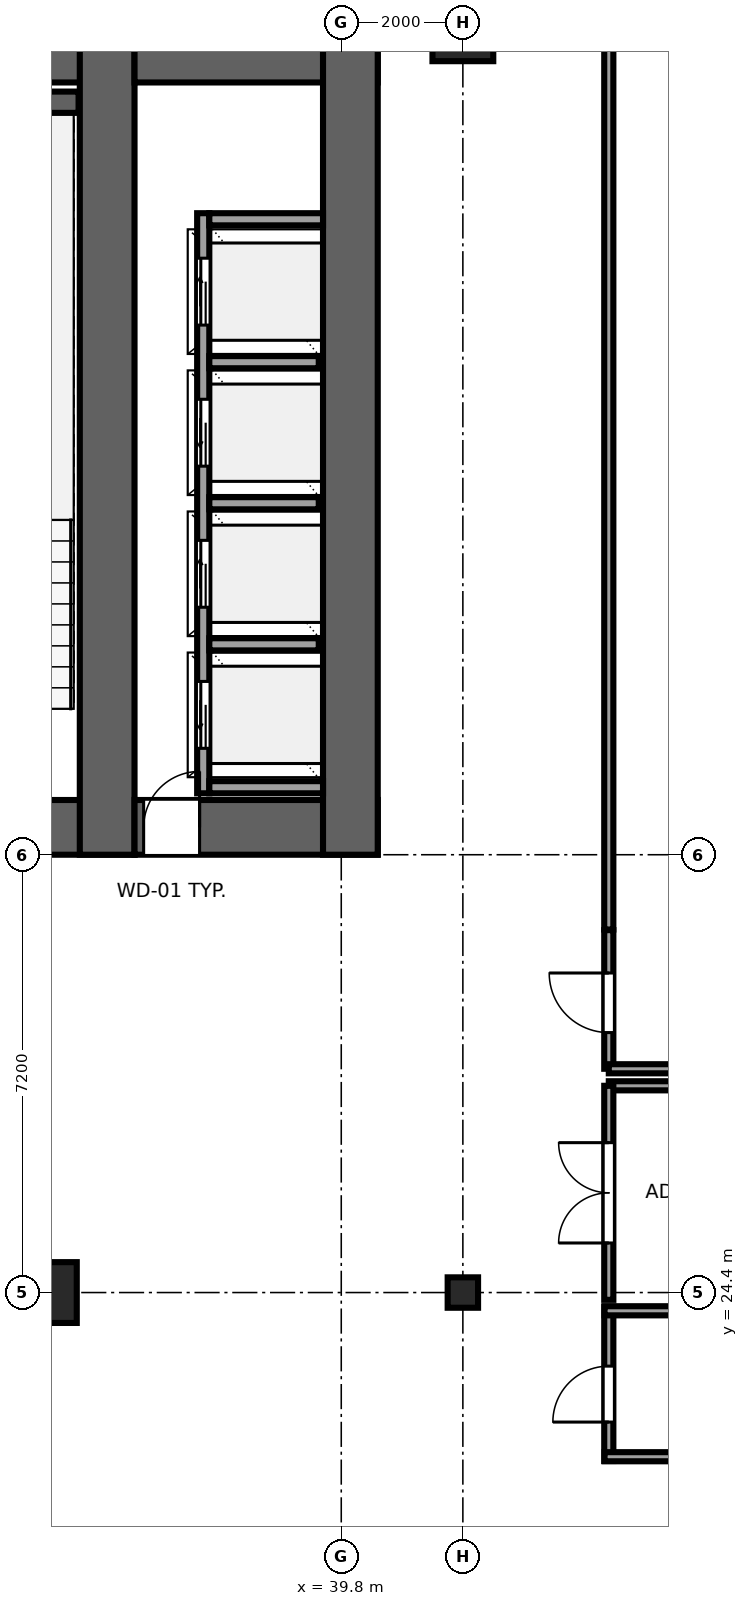
"""IFC4 building model, lengths in metres.
Left out: names, types, materials, properties, quantities, classifications, styles, units other than length and angle.
Written with IfcOpenShell. Run it as: python <this file> out.ifc"""

import sys

from ifc_helpers import new_model, si_unit, direction, frame, frame_2d, origin, origin_2d, place, context, subcontext, project, spatial, rectangle, i_section, extrude, source, transform, mapped, element, fill, save


model = new_model("IFC4")
c1 = context("Model", 3, precision=1e-05, world=origin(), true_north=direction((0.0, 1.0)))
c2 = subcontext(c1, "Body", "Model", "MODEL_VIEW")
j1 = project(units=[si_unit("LENGTHUNIT", "METRE"), si_unit("PLANEANGLEUNIT", "RADIAN")], contexts=[c1])
p1 = place(None, origin())
s1 = spatial("IfcSite", under=j1, at=p1, CompositionType="ELEMENT")
p2 = place(p1, origin())
s2 = spatial("IfcBuilding", under=s1, at=p2, CompositionType="ELEMENT")
p3 = place(p2, frame((0.0, 0.0, 42.65)))
s3 = spatial("IfcBuildingStorey", under=s2, at=p3, CompositionType="ELEMENT", Elevation=42.65)
p4 = place(p3, frame((9.6, 32.05, 0.0), z_axis=(0.0, 0.0, 1.0), x_axis=(1.0, 0.0, 0.0)))
e1 = element("IfcWall", 1, at=p4, inside=s3, PredefinedType="SHEAR", context=c2, shape_type="SweptSolid", body=[
    extrude(rectangle(XDim=26.8, YDim=0.9, at=frame_2d((13.4, 0.0))), origin(), (0.0, 0.0, 1.0), 3.55),
])
p5 = place(p4, frame((7.85, 0.0, 0.0), z_axis=(0.0, 0.0, 1.0), x_axis=(-1.0, 0.0, 0.0)))
e2 = element("IfcOpeningElement", 2, at=p5, cuts=e1, PredefinedType="OPENING", context=c2, shape_type="SweptSolid", body=[
    extrude(rectangle(XDim=1.5, YDim=2.04, at=frame_2d((0.75, 1.02))), frame((0.0, 0.46, 0.0), z_axis=(0.0, -1.0, 0.0), x_axis=(1.0, 0.0, 0.0)), (0.0, 0.0, 1.0), 0.92),
])
p6 = place(p4, frame((14.15, 0.0, 0.0), z_axis=(0.0, 0.0, 1.0), x_axis=(-1.0, 0.0, 0.0)))
e3 = element("IfcOpeningElement", 3, at=p6, cuts=e1, PredefinedType="OPENING", context=c2, shape_type="SweptSolid", body=[
    extrude(rectangle(XDim=1.5, YDim=2.04, at=frame_2d((0.75, 1.02))), frame((0.0, 0.46, 0.0), z_axis=(0.0, -1.0, 0.0), x_axis=(1.0, 0.0, 0.0)), (0.0, 0.0, 1.0), 0.92),
])
p7 = place(p4, frame((20.45, 0.0, 0.0), z_axis=(0.0, 0.0, 1.0), x_axis=(-1.0, 0.0, 0.0)))
e4 = element("IfcOpeningElement", 4, at=p7, cuts=e1, PredefinedType="OPENING", context=c2, shape_type="SweptSolid", body=[
    extrude(rectangle(XDim=1.5, YDim=2.04, at=frame_2d((0.75, 1.02))), frame((0.0, 0.46, 0.0), z_axis=(0.0, -1.0, 0.0), x_axis=(1.0, 0.0, 0.0)), (0.0, 0.0, 1.0), 0.92),
])
p8 = place(p3, frame((9.6, 44.75, 0.0), z_axis=(0.0, 0.0, 1.0), x_axis=(1.0, 0.0, 0.0)))
e5 = element("IfcWall", 5, at=p8, inside=s3, PredefinedType="SHEAR", context=c2, shape_type="SweptSolid", body=[
    extrude(rectangle(XDim=26.8, YDim=0.9, at=frame_2d((13.4, 0.0))), origin(), (0.0, 0.0, 1.0), 3.55),
])
p9 = place(p3, frame((35.95, 31.6, 0.0), z_axis=(0.0, 0.0, 1.0), x_axis=(0.0, 1.0, 0.0)))
e6 = element("IfcWall", 6, at=p9, inside=s3, PredefinedType="SHEAR", context=c2, shape_type="SweptSolid", body=[
    extrude(rectangle(XDim=13.6, YDim=0.9, at=frame_2d((6.8, 0.0))), origin(), (0.0, 0.0, 1.0), 3.55),
])
p10 = place(p3, frame((36.4, 32.05, 0.0), z_axis=(0.0, 0.0, 1.0), x_axis=(1.0, 0.0, 0.0)))
e7 = element("IfcWall", 7, at=p10, inside=s3, PredefinedType="SHEAR", context=c2, shape_type="SweptSolid", body=[
    extrude(rectangle(XDim=4.0, YDim=0.9, at=frame_2d((2.0, 0.0))), origin(), (0.0, 0.0, 1.0), 3.55),
])
p11 = place(p10, frame((1.07, 0.0, 0.0), z_axis=(0.0, 0.0, 1.0), x_axis=(-1.0, 0.0, 0.0)))
e8 = element("IfcOpeningElement", 8, at=p11, cuts=e7, PredefinedType="OPENING", context=c2, shape_type="SweptSolid", body=[
    extrude(rectangle(XDim=0.92, YDim=2.01, at=frame_2d((0.46, 1.005))), frame((0.0, 0.46, 0.0), z_axis=(0.0, -1.0, 0.0), x_axis=(1.0, 0.0, 0.0)), (0.0, 0.0, 1.0), 0.92),
])
p12 = place(p3, frame((36.4, 44.75, 0.0), z_axis=(0.0, 0.0, 1.0), x_axis=(1.0, 0.0, 0.0)))
e9 = element("IfcWall", 9, at=p12, inside=s3, PredefinedType="SHEAR", context=c2, shape_type="SweptSolid", body=[
    extrude(rectangle(XDim=4.0, YDim=0.9, at=frame_2d((2.0, 0.0))), origin(), (0.0, 0.0, 1.0), 3.55),
])
p13 = place(p3, frame((39.95, 31.6, 0.0), z_axis=(0.0, 0.0, 1.0), x_axis=(0.0, 1.0, 0.0)))
e10 = element("IfcWall", 10, at=p13, inside=s3, PredefinedType="SHEAR", context=c2, shape_type="SweptSolid", body=[
    extrude(rectangle(XDim=13.6, YDim=0.9, at=frame_2d((6.8, 0.0))), origin(), (0.0, 0.0, 1.0), 3.55),
])
p14 = place(p3, frame((31.88, 43.975, 0.0), z_axis=(0.0, 0.0, 1.0), x_axis=(1.0, 0.0, 0.0)))
e11 = element("IfcWall", 11, at=p14, inside=s3, PredefinedType="SHEAR", context=c2, shape_type="SweptSolid", body=[
    extrude(rectangle(XDim=3.6, YDim=0.35, at=frame_2d((1.8, 0.0))), origin(), (0.0, 0.0, 1.0), 3.55),
])
m1 = source(origin(), c2, "Body", "SweptSolid", [
    extrude(rectangle(XDim=1.0, YDim=1.0, at=origin_2d()), origin(), (0.0, 0.0, 1.0), 3.55),
])
p15 = place(p3, frame((34.95, 24.4, 0.0), z_axis=(0.0, 0.0, 1.0), x_axis=(1.0, 0.0, 0.0)))
e12 = element("IfcColumn", 12, at=p15, inside=s3, PredefinedType="COLUMN", context=c2, shape_type="MappedRepresentation", body=[
    mapped(m1, transform((0.0, 0.0, 0.0), x_axis=(1.0, 0.0, 0.0), y_axis=(0.0, 1.0, 0.0), z_axis=(0.0, 0.0, 1.0), scale=1.0)),
])
m2 = source(origin(), c2, "Body", "SweptSolid", [
    extrude(i_section(OverallWidth=0.5, OverallDepth=0.5, WebThickness=0.028, FlangeThickness=0.045, at=origin_2d()), origin(), (0.0, 0.0, 1.0), 3.55),
])
p16 = place(p3, frame((41.8, 24.4, 0.0), z_axis=(0.0, 0.0, 1.0), x_axis=(1.0, 0.0, 0.0)))
e13 = element("IfcColumn", 13, at=p16, inside=s3, PredefinedType="COLUMN", context=c2, shape_type="MappedRepresentation", body=[
    mapped(m2, transform((0.0, 0.0, 0.0), x_axis=(1.0, 0.0, 0.0), y_axis=(0.0, 1.0, 0.0), z_axis=(0.0, 0.0, 1.0), scale=1.0)),
])
p17 = place(p3, frame((41.8, 45.15, 0.0), z_axis=(0.0, 0.0, 1.0), x_axis=(1.0, 0.0, 0.0)))
e14 = element("IfcColumn", 14, at=p17, inside=s3, PredefinedType="COLUMN", context=c2, shape_type="MappedRepresentation", body=[
    mapped(m1, transform((0.0, 0.0, 0.0), x_axis=(1.0, 0.0, 0.0), y_axis=(0.0, 1.0, 0.0), z_axis=(0.0, 0.0, 1.0), scale=1.0)),
])
p18 = place(p3, frame((37.53, 32.61, 0.0), z_axis=(0.0, 0.0, 1.0), x_axis=(0.0, 1.0, 0.0)))
e15 = element("IfcWall", 15, at=p18, inside=s3, PredefinedType="SOLIDWALL", context=c2, shape_type="SweptSolid", body=[
    extrude(rectangle(XDim=9.54, YDim=0.2, at=frame_2d((4.77, 0.0))), origin(), (0.0, 0.0, 1.0), 3.37),
])
p19 = place(p18, frame((0.74, 0.0, 0.0)))
e16 = element("IfcOpeningElement", 16, at=p19, cuts=e15, PredefinedType="OPENING", context=c2, shape_type="SweptSolid", body=[
    extrude(rectangle(XDim=1.1, YDim=2.12, at=frame_2d((0.55, 1.06))), frame((0.0, 0.11, 0.0), z_axis=(0.0, -1.0, 0.0), x_axis=(1.0, 0.0, 0.0)), (0.0, 0.0, 1.0), 0.22),
])
p20 = place(p18, frame((3.06, 0.0, 0.0)))
e17 = element("IfcOpeningElement", 17, at=p20, cuts=e15, PredefinedType="OPENING", context=c2, shape_type="SweptSolid", body=[
    extrude(rectangle(XDim=1.1, YDim=2.12, at=frame_2d((0.55, 1.06))), frame((0.0, 0.11, 0.0), z_axis=(0.0, -1.0, 0.0), x_axis=(1.0, 0.0, 0.0)), (0.0, 0.0, 1.0), 0.22),
])
p21 = place(p18, frame((5.38, 0.0, 0.0)))
e18 = element("IfcOpeningElement", 18, at=p21, cuts=e15, PredefinedType="OPENING", context=c2, shape_type="SweptSolid", body=[
    extrude(rectangle(XDim=1.1, YDim=2.12, at=frame_2d((0.55, 1.06))), frame((0.0, 0.11, 0.0), z_axis=(0.0, -1.0, 0.0), x_axis=(1.0, 0.0, 0.0)), (0.0, 0.0, 1.0), 0.22),
])
p22 = place(p18, frame((7.7, 0.0, 0.0)))
e19 = element("IfcOpeningElement", 19, at=p22, cuts=e15, PredefinedType="OPENING", context=c2, shape_type="SweptSolid", body=[
    extrude(rectangle(XDim=1.1, YDim=2.12, at=frame_2d((0.55, 1.06))), frame((0.0, 0.11, 0.0), z_axis=(0.0, -1.0, 0.0), x_axis=(1.0, 0.0, 0.0)), (0.0, 0.0, 1.0), 0.22),
])
for number, where, z_axis, x_axis in (
    (20, (37.63, 32.71, 0.0), (0.0, 0.0, 1.0), (1.0, 0.0, 0.0)),
    (21, (37.63, 42.05, 0.0), (0.0, 0.0, 1.0), (1.0, 0.0, 0.0)),
):
    element("IfcWall", number, at=place(p3, frame(where, z_axis=z_axis, x_axis=x_axis)), inside=s3, PredefinedType="SOLIDWALL", context=c2, shape_type="SweptSolid", body=[
        extrude(rectangle(XDim=1.87, YDim=0.2, at=frame_2d((0.935, 0.0))), origin(), (0.0, 0.0, 1.0), 3.37),
    ])
for number, where, z_axis, x_axis in (
    (22, (37.63, 35.06, 0.0), (0.0, 0.0, 1.0), (1.0, 0.0, 0.0)),
    (23, (37.63, 37.38, 0.0), (0.0, 0.0, 1.0), (1.0, 0.0, 0.0)),
    (24, (37.63, 39.7, 0.0), (0.0, 0.0, 1.0), (1.0, 0.0, 0.0)),
):
    element("IfcWall", number, at=place(p3, frame(where, z_axis=z_axis, x_axis=x_axis)), inside=s3, PredefinedType="SOLIDWALL", context=c2, shape_type="SweptSolid", body=[
        extrude(rectangle(XDim=1.8, YDim=0.2, at=frame_2d((0.9, 0.0))), origin(), (0.0, 0.0, 1.0), 3.37),
    ])
p23 = place(p3, frame((44.2, 21.63, 0.0), z_axis=(0.0, 0.0, 1.0), x_axis=(0.0, 1.0, 0.0)))
e25 = element("IfcWall", 25, at=p23, inside=s3, PredefinedType="PARTITIONING", context=c2, shape_type="SweptSolid", body=[
    extrude(rectangle(XDim=2.54, YDim=0.15, at=frame_2d((1.27, 0.0))), origin(), (0.0, 0.0, 1.0), 3.37),
])
p24 = place(p23, frame((0.64, 0.0, 0.0)))
e26 = element("IfcOpeningElement", 26, at=p24, cuts=e25, PredefinedType="OPENING", context=c2, shape_type="SweptSolid", body=[
    extrude(rectangle(XDim=0.92, YDim=2.01, at=frame_2d((0.46, 1.005))), frame((0.0, 0.085, 0.0), z_axis=(0.0, -1.0, 0.0), x_axis=(1.0, 0.0, 0.0)), (0.0, 0.0, 1.0), 0.17),
])
p25 = place(p3, frame((44.13, 21.7, 0.0), z_axis=(0.0, 0.0, 1.0), x_axis=(1.0, 0.0, 0.0)))
e27 = element("IfcWall", 27, at=p25, inside=s3, PredefinedType="PARTITIONING", context=c2, shape_type="SweptSolid", body=[
    extrude(rectangle(XDim=4.54, YDim=0.15, at=frame_2d((2.27, 0.0))), origin(), (0.0, 0.0, 1.0), 3.37),
])
p26 = place(p3, frame((44.13, 24.1, 0.0), z_axis=(0.0, 0.0, 1.0), x_axis=(1.0, 0.0, 0.0)))
e28 = element("IfcWall", 28, at=p26, inside=s3, PredefinedType="PARTITIONING", context=c2, shape_type="SweptSolid", body=[
    extrude(rectangle(XDim=12.465, YDim=0.15, at=frame_2d((6.232, 0.0))), origin(), (0.0, 0.0, 1.0), 3.37),
])
p27 = place(p3, frame((44.2, 27.8, 0.0), z_axis=(0.0, 0.0, 1.0), x_axis=(1.0, 0.0, 0.0)))
e29 = element("IfcWall", 29, at=p27, inside=s3, PredefinedType="PARTITIONING", context=c2, shape_type="SweptSolid", body=[
    extrude(rectangle(XDim=12.395, YDim=0.15, at=frame_2d((6.198, 0.0))), origin(), (0.0, 0.0, 1.0), 3.37),
])
p28 = place(p3, frame((44.2, 24.28, 0.0), z_axis=(0.0, 0.0, 1.0), x_axis=(0.0, 1.0, 0.0)))
e30 = element("IfcWall", 30, at=p28, inside=s3, PredefinedType="PARTITIONING", context=c2, shape_type="SweptSolid", body=[
    extrude(rectangle(XDim=3.52, YDim=0.15, at=frame_2d((1.76, 0.0))), origin(), (0.0, 0.0, 1.0), 3.37),
])
p29 = place(p28, frame((0.935, 0.0, 0.0)))
e31 = element("IfcOpeningElement", 31, at=p29, cuts=e30, PredefinedType="OPENING", context=c2, shape_type="SweptSolid", body=[
    extrude(rectangle(XDim=1.65, YDim=2.15, at=frame_2d((0.825, 1.075))), frame((0.0, 0.085, 0.0), z_axis=(0.0, -1.0, 0.0), x_axis=(1.0, 0.0, 0.0)), (0.0, 0.0, 1.0), 0.17),
])
p30 = place(p3, frame((44.2, 28.08, 0.0), z_axis=(0.0, 0.0, 1.0), x_axis=(0.0, 1.0, 0.0)))
e32 = element("IfcWall", 32, at=p30, inside=s3, PredefinedType="PARTITIONING", context=c2, shape_type="SweptSolid", body=[
    extrude(rectangle(XDim=2.28, YDim=0.15, at=frame_2d((1.14, 0.0))), origin(), (0.0, 0.0, 1.0), 3.37),
])
p31 = place(p30, frame((0.595, 0.0, 0.0)))
e33 = element("IfcOpeningElement", 33, at=p31, cuts=e32, PredefinedType="OPENING", context=c2, shape_type="SweptSolid", body=[
    extrude(rectangle(XDim=0.98, YDim=2.12, at=frame_2d((0.49, 1.06))), frame((0.0, 0.085, 0.0), z_axis=(0.0, -1.0, 0.0), x_axis=(1.0, 0.0, 0.0)), (0.0, 0.0, 1.0), 0.17),
])
p32 = place(p3, frame((44.2, 28.08, 0.0), z_axis=(0.0, 0.0, 1.0), x_axis=(1.0, 0.0, 0.0)))
e34 = element("IfcWall", 34, at=p32, inside=s3, PredefinedType="PARTITIONING", context=c2, shape_type="SweptSolid", body=[
    extrude(rectangle(XDim=10.03, YDim=0.15, at=frame_2d((5.015, 0.0))), origin(), (0.0, 0.0, 1.0), 3.37),
])
p33 = place(p3, frame((44.2, 30.37, 0.0), z_axis=(0.0, 0.0, 1.0), x_axis=(0.0, 1.0, 0.0)))
e35 = element("IfcWall", 35, at=p33, inside=s3, PredefinedType="PARTITIONING", context=c2, shape_type="SweptSolid", body=[
    extrude(rectangle(XDim=15.225, YDim=0.15, at=frame_2d((7.612, 0.0))), origin(), (0.0, 0.0, 1.0), 3.37),
])
m3 = source(origin(), c2, "Body", "SweptSolid", [
    extrude(rectangle(XDim=0.92, YDim=2.01, at=frame_2d((0.46, 1.005))), frame((0.0, 0.025, 0.0), z_axis=(0.0, -1.0, 0.0), x_axis=(1.0, 0.0, 0.0)), (0.0, 0.0, 1.0), 0.05),
])
p34 = place(p11, origin())
e36 = element("IfcDoor", 36, at=p34, inside=s3, OperationType="SINGLE_SWING_RIGHT", PredefinedType="DOOR", context=c2, shape_type="MappedRepresentation", body=[
    mapped(m3, transform((0.0, 0.0, 0.0), x_axis=(1.0, 0.0, 0.0), y_axis=(0.0, 1.0, 0.0), z_axis=(0.0, 0.0, 1.0), scale=1.0)),
])
fill(e8, e36)
m4 = source(origin(), c2, "Body", "SweptSolid", [
    extrude(rectangle(XDim=1.1, YDim=2.12, at=frame_2d((0.55, 1.06))), frame((0.0, 0.025, 0.0), z_axis=(0.0, -1.0, 0.0), x_axis=(1.0, 0.0, 0.0)), (0.0, 0.0, 1.0), 0.05),
])
p35 = place(p19, origin())
e37 = element("IfcDoor", 37, at=p35, inside=s3, OperationType="SLIDING_TO_LEFT", PredefinedType="DOOR", context=c2, shape_type="MappedRepresentation", body=[
    mapped(m4, transform((0.0, 0.0, 0.0), x_axis=(1.0, 0.0, 0.0), y_axis=(0.0, 1.0, 0.0), z_axis=(0.0, 0.0, 1.0), scale=1.0)),
])
fill(e16, e37)
p36 = place(p20, origin())
e38 = element("IfcDoor", 38, at=p36, inside=s3, OperationType="SLIDING_TO_RIGHT", PredefinedType="DOOR", context=c2, shape_type="MappedRepresentation", body=[
    mapped(m4, transform((0.0, 0.0, 0.0), x_axis=(1.0, 0.0, 0.0), y_axis=(0.0, 1.0, 0.0), z_axis=(0.0, 0.0, 1.0), scale=1.0)),
])
fill(e17, e38)
p37 = place(p21, origin())
e39 = element("IfcDoor", 39, at=p37, inside=s3, OperationType="SLIDING_TO_LEFT", PredefinedType="DOOR", context=c2, shape_type="MappedRepresentation", body=[
    mapped(m4, transform((0.0, 0.0, 0.0), x_axis=(1.0, 0.0, 0.0), y_axis=(0.0, 1.0, 0.0), z_axis=(0.0, 0.0, 1.0), scale=1.0)),
])
fill(e18, e39)
p38 = place(p22, origin())
e40 = element("IfcDoor", 40, at=p38, inside=s3, OperationType="SLIDING_TO_RIGHT", PredefinedType="DOOR", context=c2, shape_type="MappedRepresentation", body=[
    mapped(m4, transform((0.0, 0.0, 0.0), x_axis=(1.0, 0.0, 0.0), y_axis=(0.0, 1.0, 0.0), z_axis=(0.0, 0.0, 1.0), scale=1.0)),
])
fill(e19, e40)
p39 = place(p24, origin())
e41 = element("IfcDoor", 41, at=p39, inside=s3, OperationType="SINGLE_SWING_LEFT", PredefinedType="DOOR", context=c2, shape_type="MappedRepresentation", body=[
    mapped(m3, transform((0.0, 0.0, 0.0), x_axis=(1.0, 0.0, 0.0), y_axis=(0.0, 1.0, 0.0), z_axis=(0.0, 0.0, 1.0), scale=1.0)),
])
fill(e26, e41)
m5 = source(origin(), c2, "Body", "SweptSolid", [
    extrude(rectangle(XDim=1.65, YDim=2.15, at=frame_2d((0.825, 1.075))), frame((0.0, 0.025, 0.0), z_axis=(0.0, -1.0, 0.0), x_axis=(1.0, 0.0, 0.0)), (0.0, 0.0, 1.0), 0.05),
])
p40 = place(p29, origin())
e42 = element("IfcDoor", 42, at=p40, inside=s3, OperationType="DOUBLE_DOOR_SINGLE_SWING", PredefinedType="DOOR", context=c2, shape_type="MappedRepresentation", body=[
    mapped(m5, transform((0.0, 0.0, 0.0), x_axis=(1.0, 0.0, 0.0), y_axis=(0.0, 1.0, 0.0), z_axis=(0.0, 0.0, 1.0), scale=1.0)),
])
fill(e31, e42)
m6 = source(origin(), c2, "Body", "SweptSolid", [
    extrude(rectangle(XDim=0.98, YDim=2.12, at=frame_2d((0.49, 1.06))), frame((0.0, 0.025, 0.0), z_axis=(0.0, -1.0, 0.0), x_axis=(1.0, 0.0, 0.0)), (0.0, 0.0, 1.0), 0.05),
])
p41 = place(p31, origin())
e43 = element("IfcDoor", 43, at=p41, inside=s3, OperationType="SINGLE_SWING_RIGHT", PredefinedType="DOOR", context=c2, shape_type="MappedRepresentation", body=[
    mapped(m6, transform((0.0, 0.0, 0.0), x_axis=(1.0, 0.0, 0.0), y_axis=(0.0, 1.0, 0.0), z_axis=(0.0, 0.0, 1.0), scale=1.0)),
])
fill(e33, e43)
save(model, sys.argv[1])
